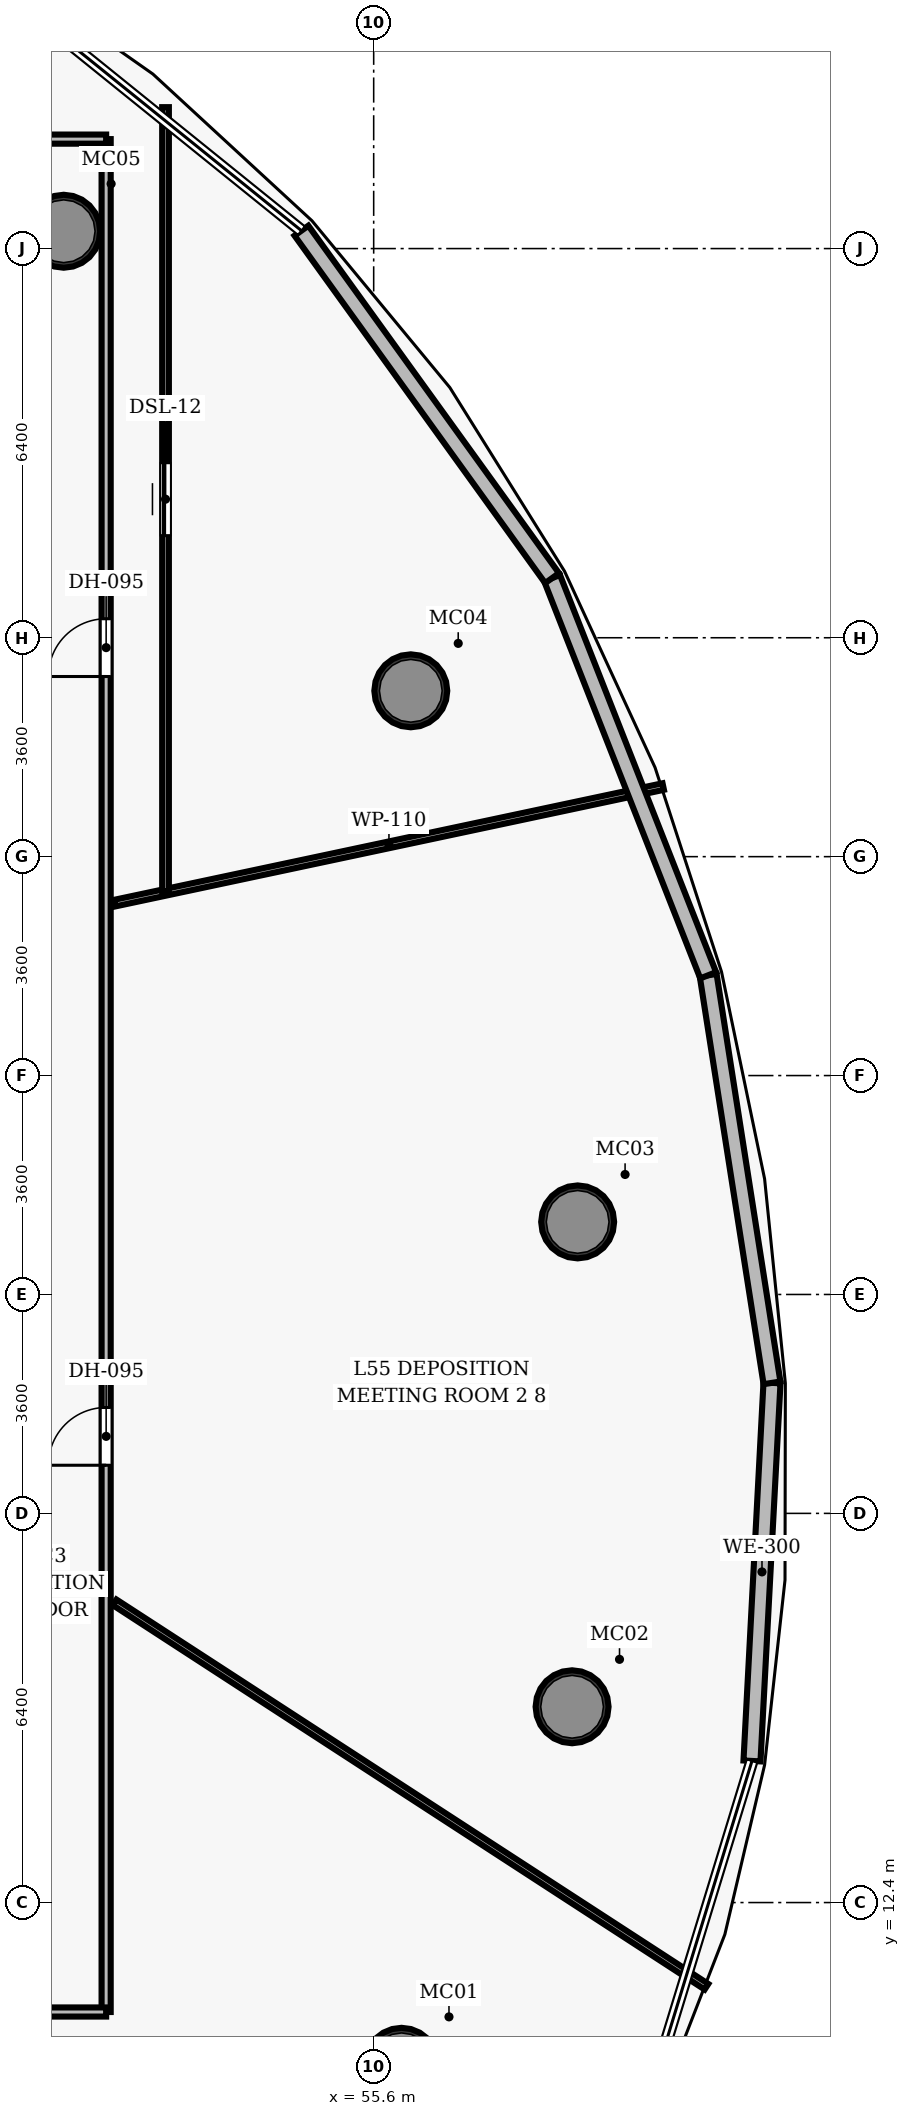
"""IFC4 building model, lengths in metres.
Left out: names, types, materials, properties, quantities, classifications, styles, units other than length and angle.
Written with IfcOpenShell. Run it as: python <this file> out.ifc"""

import sys

from ifc_helpers import new_model, si_unit, direction, frame, frame_2d, origin, origin_2d, place, context, subcontext, project, spatial, rectangle, hollow_circle, extrude, element, fill, save


model = new_model("IFC4")
c1 = context("Model", 3, precision=1e-05, world=origin(), true_north=direction((0.0, 1.0)))
c2 = subcontext(c1, "Body", "Model", "MODEL_VIEW")
j1 = project(units=[si_unit("LENGTHUNIT", "METRE"), si_unit("PLANEANGLEUNIT", "RADIAN")], contexts=[c1])
p1 = place(None, origin())
s1 = spatial("IfcSite", under=j1, at=p1, CompositionType="ELEMENT")
p2 = place(p1, origin())
s2 = spatial("IfcBuilding", under=s1, at=p2, CompositionType="ELEMENT")
p3 = place(p2, frame((0.0, 0.0, 217.4)))
s3 = spatial("IfcBuildingStorey", under=s2, at=p3, CompositionType="ELEMENT", Elevation=217.4)
for number, where, z_axis, x_axis in (
    (1, (56.058, 9.74, 0.0), (0.0, 0.0, 1.0), (1.0, 0.0, 0.0)),
    (2, (58.863, 15.619, 0.0), (0.0, 0.0, 1.0), (1.0, 0.0, 0.0)),
    (3, (58.955, 23.594, 0.0), (0.0, 0.0, 1.0), (1.0, 0.0, 0.0)),
    (4, (56.21, 32.327, 0.0), (0.0, 0.0, 1.0), (1.0, 0.0, 0.0)),
    (5, (50.502, 39.885, 0.0), (0.0, 0.0, 1.0), (1.0, 0.0, 0.0)),
):
    element("IfcColumn", number, at=place(p3, frame(where, z_axis=z_axis, x_axis=x_axis)), inside=s3, PredefinedType="COLUMN", context=c2, shape_type="SweptSolid", body=[
        extrude(hollow_circle(Radius=0.6, WallThickness=0.05, at=origin_2d()), origin(), (0.0, 0.0, 1.0), 3.85),
    ])
p4 = place(p3, frame((51.2, 10.6, 0.0), z_axis=(0.0, 0.0, 1.0), x_axis=(0.0, 1.0, 0.0)))
e6 = element("IfcWall", 6, at=p4, inside=s3, PredefinedType="PARTITIONING", context=c2, shape_type="SweptSolid", body=[
    extrude(rectangle(XDim=30.8, YDim=0.15, at=frame_2d((15.4, 0.0))), origin(), (0.0, 0.0, 1.0), 3.035),
])
p5 = place(p4, frame((21.962, 0.0, 0.0)))
e7 = element("IfcOpeningElement", 7, at=p5, cuts=e6, PredefinedType="OPENING", context=c2, shape_type="SweptSolid", body=[
    extrude(rectangle(XDim=0.95, YDim=2.15, at=frame_2d((0.475, 1.075))), frame((0.0, 0.085, 0.0), z_axis=(0.0, -1.0, 0.0), x_axis=(1.0, 0.0, 0.0)), (0.0, 0.0, 1.0), 0.17),
])
p6 = place(p4, frame((8.992, 0.0, 0.0)))
e8 = element("IfcOpeningElement", 8, at=p6, cuts=e6, PredefinedType="OPENING", context=c2, shape_type="SweptSolid", body=[
    extrude(rectangle(XDim=0.95, YDim=2.15, at=frame_2d((0.475, 1.075))), frame((0.0, 0.085, 0.0), z_axis=(0.0, -1.0, 0.0), x_axis=(1.0, 0.0, 0.0)), (0.0, 0.0, 1.0), 0.17),
])
for number, where, z_axis, x_axis in (
    (9, (49.1, 10.6, 0.0), (0.0, 0.0, 1.0), (1.0, 0.0, 0.0)),
    (10, (49.1, 41.4, 0.0), (0.0, 0.0, 1.0), (1.0, 0.0, 0.0)),
):
    element("IfcWall", number, at=place(p3, frame(where, z_axis=z_axis, x_axis=x_axis)), inside=s3, PredefinedType="PARTITIONING", context=c2, shape_type="SweptSolid", body=[
        extrude(rectangle(XDim=2.1, YDim=0.15, at=frame_2d((1.05, 0.0))), origin(), (0.0, 0.0, 1.0), 3.035),
    ])
p7 = place(p3, frame((51.34, 28.835, 0.0), z_axis=(0.0, 0.0, 1.0), x_axis=(0.978142366877, 0.207936312655, 0.0)))
e11 = element("IfcWall", 11, at=p7, inside=s3, PredefinedType="PARTITIONING", context=c2, shape_type="SweptSolid", body=[
    extrude(rectangle(XDim=9.224, YDim=0.11, at=frame_2d((4.612, 0.0))), origin(), (0.0, 0.0, 1.0), 3.035),
])
p8 = place(p3, frame((51.34, 17.337, 0.0), z_axis=(0.0, 0.0, 1.0), x_axis=(0.838666550767, -0.544645220877, 0.0)))
e12 = element("IfcWall", 12, at=p8, inside=s3, PredefinedType="PARTITIONING", context=c2, shape_type="SweptSolid", body=[
    extrude(rectangle(XDim=11.606, YDim=0.11, at=frame_2d((5.803, 0.0))), origin(), (0.0, 0.0, 1.0), 3.035),
])
p9 = place(p3, frame((52.177, 29.031, 0.0), z_axis=(0.0, 0.0, 1.0), x_axis=(0.0, 1.0, 0.0)))
e13 = element("IfcWall", 13, at=p9, inside=s3, PredefinedType="PARTITIONING", context=c2, shape_type="SweptSolid", body=[
    extrude(rectangle(XDim=12.894, YDim=0.11, at=frame_2d((6.447, 0.0))), origin(), (0.0, 0.0, 1.0), 3.035),
])
p10 = place(p9, frame((5.847, 0.0, 0.0)))
e14 = element("IfcOpeningElement", 14, at=p10, cuts=e13, PredefinedType="OPENING", context=c2, shape_type="SweptSolid", body=[
    extrude(rectangle(XDim=1.2, YDim=2.15, at=frame_2d((0.6, 1.075))), frame((0.0, 0.065, 0.0), z_axis=(0.0, -1.0, 0.0), x_axis=(1.0, 0.0, 0.0)), (0.0, 0.0, 1.0), 0.13),
])
p11 = place(p3, frame((62.151, 20.946, 0.0), z_axis=(0.0, 0.0, 1.0), x_axis=(-0.052818148449, -0.998604147395, 0.0)))
e15 = element("IfcWall", 15, at=p11, inside=s3, PredefinedType="SOLIDWALL", context=c2, shape_type="SweptSolid", body=[
    extrude(rectangle(XDim=6.226, YDim=0.28, at=frame_2d((3.113, 0.0))), origin(), (0.0, 0.0, 1.0), 3.62),
])
p12 = place(p3, frame((61.101, 27.649, 0.0), z_axis=(0.0, 0.0, 1.0), x_axis=(0.154657882949, -0.987968086145, 0.0)))
e16 = element("IfcWall", 16, at=p12, inside=s3, PredefinedType="SOLIDWALL", context=c2, shape_type="SweptSolid", body=[
    extrude(rectangle(XDim=6.785, YDim=0.28, at=frame_2d((3.392, 0.0))), origin(), (0.0, 0.0, 1.0), 3.62),
])
p13 = place(p3, frame((58.534, 34.18, 0.0), z_axis=(0.0, 0.0, 1.0), x_axis=(0.365853647231, -0.930672396071, 0.0)))
e17 = element("IfcWall", 17, at=p13, inside=s3, PredefinedType="SOLIDWALL", context=c2, shape_type="SweptSolid", body=[
    extrude(rectangle(XDim=7.018, YDim=0.28, at=frame_2d((3.509, 0.0))), origin(), (0.0, 0.0, 1.0), 3.62),
])
p14 = place(p3, frame((54.412, 39.895, 0.0), z_axis=(0.0, 0.0, 1.0), x_axis=(0.585021079156, -0.811018086693, 0.0)))
e18 = element("IfcWall", 18, at=p14, inside=s3, PredefinedType="SOLIDWALL", context=c2, shape_type="SweptSolid", body=[
    extrude(rectangle(XDim=7.046, YDim=0.28, at=frame_2d((3.523, 0.0))), origin(), (0.0, 0.0, 1.0), 3.62),
])
p15 = place(p5, origin())
e19 = element("IfcDoor", 19, at=p15, inside=s3, OperationType="SINGLE_SWING_LEFT", PredefinedType="DOOR", context=c2, shape_type="SweptSolid", body=[
    extrude(rectangle(XDim=0.95, YDim=2.15, at=frame_2d((0.475, 1.075))), frame((0.0, 0.025, 0.0), z_axis=(0.0, -1.0, 0.0), x_axis=(1.0, 0.0, 0.0)), (0.0, 0.0, 1.0), 0.05),
])
fill(e7, e19)
p16 = place(p10, origin())
e20 = element("IfcDoor", 20, at=p16, inside=s3, OperationType="SLIDING_TO_RIGHT", PredefinedType="DOOR", context=c2, shape_type="SweptSolid", body=[
    extrude(rectangle(XDim=1.2, YDim=2.15, at=frame_2d((0.6, 1.075))), frame((0.0, 0.025, 0.0), z_axis=(0.0, -1.0, 0.0), x_axis=(1.0, 0.0, 0.0)), (0.0, 0.0, 1.0), 0.05),
])
fill(e14, e20)
p17 = place(p6, origin())
e21 = element("IfcDoor", 21, at=p17, inside=s3, OperationType="SINGLE_SWING_LEFT", PredefinedType="DOOR", context=c2, shape_type="SweptSolid", body=[
    extrude(rectangle(XDim=0.95, YDim=2.15, at=frame_2d((0.475, 1.075))), frame((0.0, 0.025, 0.0), z_axis=(0.0, -1.0, 0.0), x_axis=(1.0, 0.0, 0.0)), (0.0, 0.0, 1.0), 0.05),
])
fill(e8, e21)
save(model, sys.argv[1])
